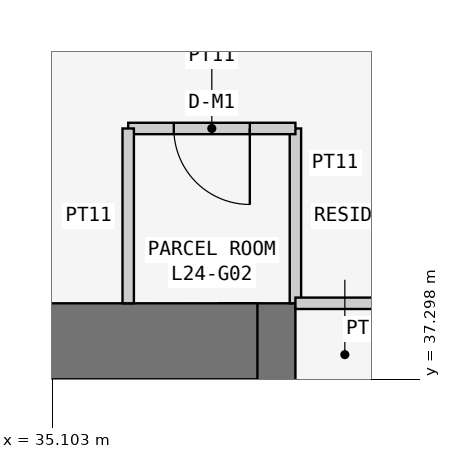
"""IFC4 building model, lengths in metres.
Left out: names, types, materials, properties, quantities, classifications, styles, units other than length and angle.
Written with IfcOpenShell. Run it as: python <this file> out.ifc"""

import sys

from ifc_helpers import new_model, si_unit, direction, frame, frame_2d, origin, place, context, subcontext, project, spatial, rectangle, extrude, element, fill, save


model = new_model("IFC4")
c1 = context("Model", 3, precision=1e-05, world=origin(), true_north=direction((0.0, 1.0)))
c2 = subcontext(c1, "Body", "Model", "MODEL_VIEW")
j1 = project(units=[si_unit("LENGTHUNIT", "METRE"), si_unit("PLANEANGLEUNIT", "RADIAN")], contexts=[c1])
p1 = place(None, origin())
s1 = spatial("IfcSite", under=j1, at=p1, CompositionType="ELEMENT")
p2 = place(p1, origin())
s2 = spatial("IfcBuilding", under=s1, at=p2, CompositionType="ELEMENT")
p3 = place(p2, frame((0.0, 0.0, 95.7)))
s3 = spatial("IfcBuildingStorey", under=s2, at=p3, CompositionType="ELEMENT", Elevation=95.7)
p4 = place(p3, frame((37.8, 21.0, 0.0), z_axis=(0.0, 0.0, 1.0), x_axis=(0.0, 1.0, 0.0)))
e1 = element("IfcWall", 1, at=p4, inside=s3, PredefinedType="SHEAR", context=c2, shape_type="SweptSolid", body=[
    extrude(rectangle(XDim=17.3, YDim=1.0, at=frame_2d((8.65, 0.0))), origin(), (0.0, 0.0, 1.0), 3.6),
])
p5 = place(p4, frame((5.2, 0.0, 0.0)))
e2 = element("IfcOpeningElement", 2, at=p5, cuts=e1, PredefinedType="OPENING", context=c2, shape_type="SweptSolid", body=[
    extrude(rectangle(XDim=1.2, YDim=2.1, at=frame_2d((0.6, 1.05))), frame((0.0, 0.51, 0.0), z_axis=(0.0, -1.0, 0.0), x_axis=(1.0, 0.0, 0.0)), (0.0, 0.0, 1.0), 1.02),
])
p6 = place(p3, frame((37.8, 37.8, 0.0), z_axis=(0.0, 0.0, 1.0), x_axis=(-1.0, 0.0, 0.0)))
e3 = element("IfcWall", 3, at=p6, inside=s3, PredefinedType="SHEAR", context=c2, shape_type="SweptSolid", body=[
    extrude(rectangle(XDim=17.3, YDim=1.0, at=frame_2d((8.65, 0.0))), origin(), (0.0, 0.0, 1.0), 3.6),
])
p7 = place(p3, frame((38.3, 38.3, 0.0), z_axis=(0.0, 0.0, 1.0), x_axis=(0.0, 1.0, 0.0)))
e4 = element("IfcWall", 4, at=p7, inside=s3, PredefinedType="PARTITIONING", context=c2, shape_type="SweptSolid", body=[
    extrude(rectangle(XDim=2.3, YDim=0.15, at=frame_2d((1.15, 0.0))), origin(), (0.0, 0.0, 1.0), 3.45),
])
p8 = place(p3, frame((38.3, 40.6, 0.0), z_axis=(0.0, 0.0, 1.0), x_axis=(-1.0, 0.0, 0.0)))
e5 = element("IfcWall", 5, at=p8, inside=s3, PredefinedType="PARTITIONING", context=c2, shape_type="SweptSolid", body=[
    extrude(rectangle(XDim=2.2, YDim=0.15, at=frame_2d((1.1, 0.0))), origin(), (0.0, 0.0, 1.0), 3.45),
])
p9 = place(p8, frame((0.6, 0.0, 0.0)))
e6 = element("IfcOpeningElement", 6, at=p9, cuts=e5, PredefinedType="OPENING", context=c2, shape_type="SweptSolid", body=[
    extrude(rectangle(XDim=1.0, YDim=2.1, at=frame_2d((0.5, 1.05))), frame((0.0, 0.085, 0.0), z_axis=(0.0, -1.0, 0.0), x_axis=(1.0, 0.0, 0.0)), (0.0, 0.0, 1.0), 0.17),
])
p10 = place(p3, frame((36.1, 40.6, 0.0), z_axis=(0.0, 0.0, 1.0), x_axis=(0.0, -1.0, 0.0)))
e7 = element("IfcWall", 7, at=p10, inside=s3, PredefinedType="PARTITIONING", context=c2, shape_type="SweptSolid", body=[
    extrude(rectangle(XDim=2.3, YDim=0.15, at=frame_2d((1.15, 0.0))), origin(), (0.0, 0.0, 1.0), 3.45),
])
p11 = place(p3, frame((40.25, 38.3, 0.0), z_axis=(0.0, 0.0, 1.0), x_axis=(-1.0, 0.0, 0.0)))
e8 = element("IfcWall", 8, at=p11, inside=s3, PredefinedType="PARTITIONING", context=c2, shape_type="SweptSolid", body=[
    extrude(rectangle(XDim=1.95, YDim=0.15, at=frame_2d((0.975, 0.0))), origin(), (0.0, 0.0, 1.0), 3.45),
])
p12 = place(p9, origin())
e9 = element("IfcDoor", 9, at=p12, inside=s3, OperationType="SINGLE_SWING_LEFT", PredefinedType="DOOR", context=c2, shape_type="SweptSolid", body=[
    extrude(rectangle(XDim=1.0, YDim=2.1, at=frame_2d((0.5, 1.05))), frame((0.0, 0.025, 0.0), z_axis=(0.0, -1.0, 0.0), x_axis=(1.0, 0.0, 0.0)), (0.0, 0.0, 1.0), 0.05),
])
fill(e6, e9)
save(model, sys.argv[1])
